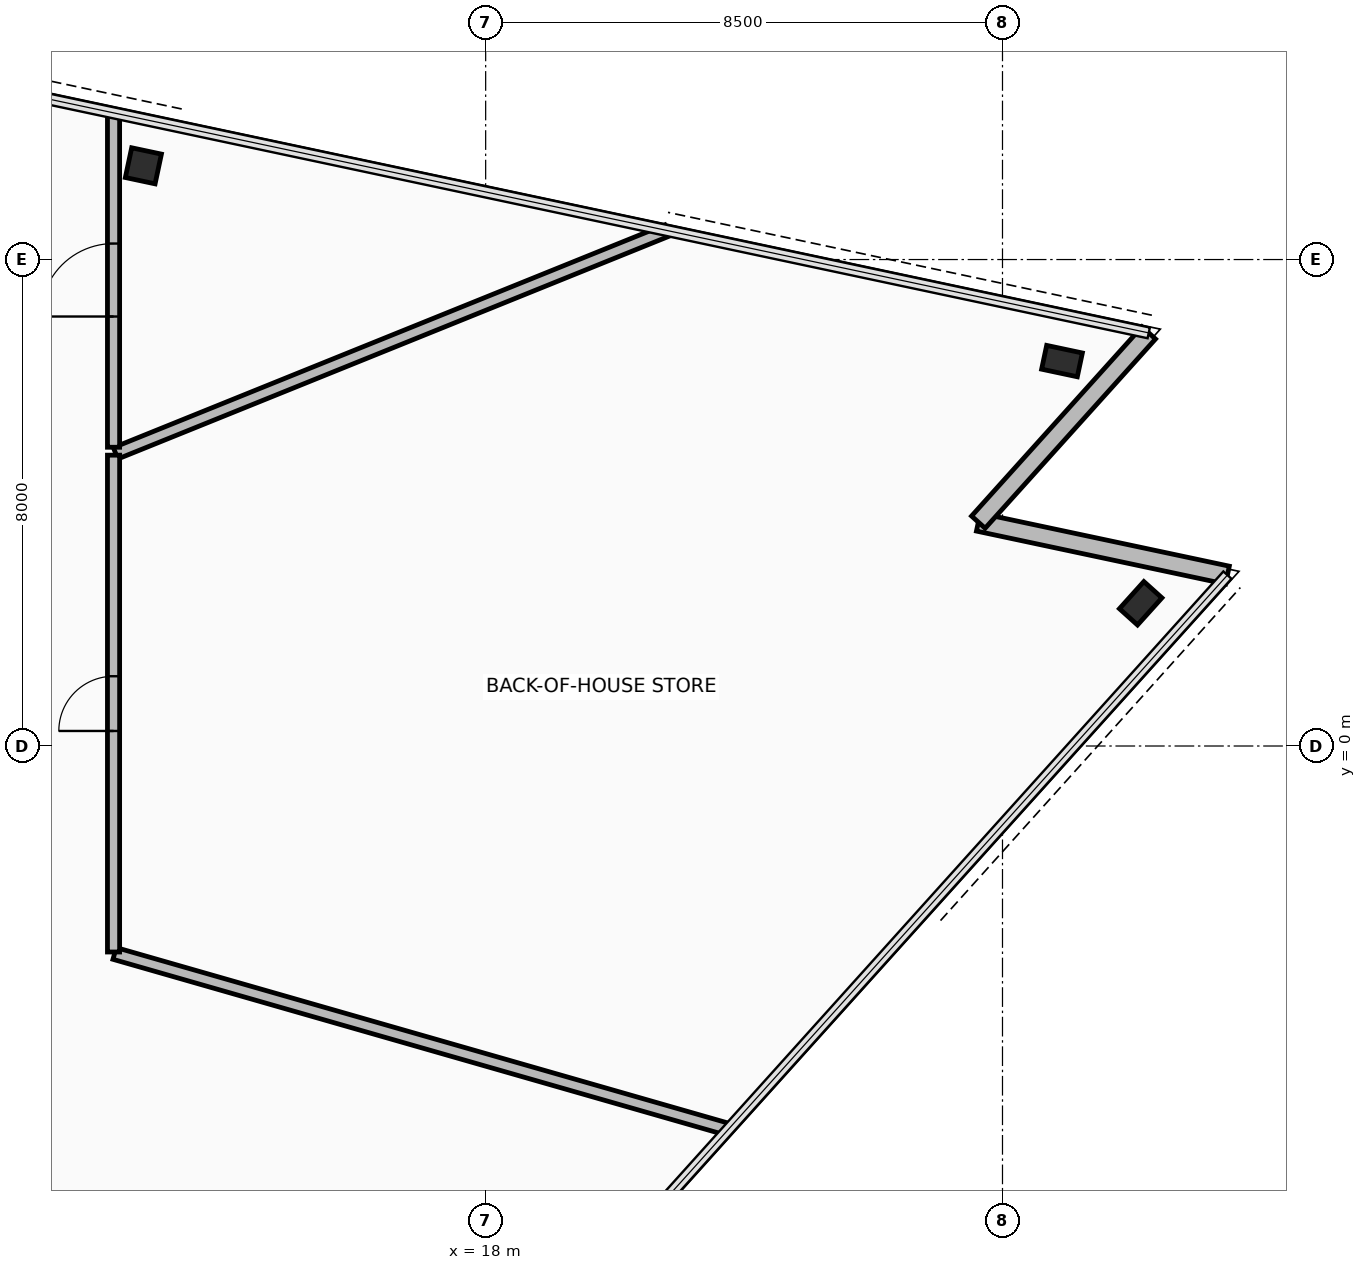
"""IFC4 building model, lengths in metres.
Left out: names, types, materials, properties, quantities, classifications, styles, units other than length and angle.
Written with IfcOpenShell. Run it as: python <this file> out.ifc"""

import sys

from ifc_helpers import new_model, si_unit, direction, frame, frame_2d, origin, origin_2d, place, context, subcontext, project, spatial, rectangle, hollow_rectangle, extrude, element, fill, save


model = new_model("IFC4")
c1 = context("Model", 3, precision=1e-05, world=origin(), true_north=direction((0.0, 1.0)))
c2 = subcontext(c1, "Body", "Model", "MODEL_VIEW")
j1 = project(units=[si_unit("LENGTHUNIT", "METRE"), si_unit("PLANEANGLEUNIT", "RADIAN")], contexts=[c1])
p1 = place(None, origin())
s1 = spatial("IfcSite", under=j1, at=p1, CompositionType="ELEMENT")
p2 = place(p1, origin())
s2 = spatial("IfcBuilding", under=s1, at=p2, CompositionType="ELEMENT")
p3 = place(p2, frame((0.0, 0.0, 196.85)))
s3 = spatial("IfcBuildingStorey", under=s2, at=p3, CompositionType="ELEMENT", Elevation=196.85)
for number, where, z_axis, x_axis in (
    (1, (28.773, 2.347, 0.0), (0.0, 0.0, 1.0), (0.669, 0.743, 0.0)),
    (2, (27.479, 6.33, 0.0), (0.0, 0.0, 1.0), (-0.978, 0.208, 0.0)),
):
    element("IfcColumn", number, at=place(p3, frame(where, z_axis=z_axis, x_axis=x_axis)), inside=s3, PredefinedType="COLUMN", context=c2, shape_type="SweptSolid", body=[
        extrude(hollow_rectangle(XDim=0.4, YDim=0.6, WallThickness=0.03, at=origin_2d()), origin(), (0.0, 0.0, 1.0), 3.6),
    ])
p4 = place(p3, frame((12.371, 9.542, -0.19), z_axis=(0.0, 0.0, 1.0), x_axis=(-0.978147600734, 0.207911690818, 0.0)))
e3 = element("IfcColumn", 3, at=p4, inside=s3, PredefinedType="COLUMN", context=c2, shape_type="SweptSolid", body=[
    extrude(hollow_rectangle(XDim=0.5, YDim=0.5, WallThickness=0.032, at=origin_2d()), origin(), (0.0, 0.0, 1.0), 3.79),
])
for number, where, z_axis, x_axis in (
    (4, (30.199, 2.811, 0.0), (0.0, 0.0, 1.0), (-0.978, 0.208, 0.0)),
    (5, (26.103, 3.681, 0.0), (0.0, 0.0, 1.0), (0.669, 0.743, 0.0)),
):
    element("IfcWall", number, at=place(p3, frame(where, z_axis=z_axis, x_axis=x_axis)), inside=s3, PredefinedType="STANDARD", context=c2, shape_type="SweptSolid", body=[
        extrude(rectangle(XDim=4.188, YDim=0.3, at=frame_2d((2.094, 0.0))), origin(), (0.0, 0.0, 1.0), 2.715),
    ])
p5 = place(p3, frame((20.983, 8.478, 0.0), z_axis=(0.0, 0.0, 1.0), x_axis=(-0.927188658935, -0.374594701969, 0.0)))
e6 = element("IfcWall", 6, at=p5, inside=s3, PredefinedType="PARTITIONING", context=c2, shape_type="SweptSolid", body=[
    extrude(rectangle(XDim=9.781, YDim=0.2, at=frame_2d((4.89, 0.0))), origin(), (0.0, 0.0, 1.0), 2.715),
])
p6 = place(p3, frame((11.88, 4.913, 0.0), z_axis=(0.0, 0.0, 1.0), x_axis=(0.0, 1.0, 0.0)))
e7 = element("IfcWall", 7, at=p6, inside=s3, PredefinedType="PARTITIONING", context=c2, shape_type="SweptSolid", body=[
    extrude(rectangle(XDim=5.499, YDim=0.2, at=frame_2d((2.75, 0.0))), origin(), (0.0, 0.0, 1.0), 2.715),
])
p7 = place(p6, frame((2.15, 0.0, 0.0)))
e8 = element("IfcOpeningElement", 8, at=p7, cuts=e7, PredefinedType="OPENING", context=c2, shape_type="SweptSolid", body=[
    extrude(rectangle(XDim=1.2, YDim=2.15, at=frame_2d((0.6, 1.075))), frame((0.0, 0.11, 0.0), z_axis=(0.0, -1.0, 0.0), x_axis=(1.0, 0.0, 0.0)), (0.0, 0.0, 1.0), 0.22),
])
p8 = place(p3, frame((21.976, -6.302, 0.0), z_axis=(0.0, 0.0, 1.0), x_axis=(-0.961257228778, 0.275652934179, 0.0)))
e9 = element("IfcWall", 9, at=p8, inside=s3, PredefinedType="PARTITIONING", context=c2, shape_type="SweptSolid", body=[
    extrude(rectangle(XDim=10.484, YDim=0.2, at=frame_2d((5.242, 0.0))), origin(), (0.0, 0.0, 1.0), 2.715),
])
p9 = place(p3, frame((11.88, -3.388, 0.0), z_axis=(0.0, 0.0, 1.0), x_axis=(0.0, 1.0, 0.0)))
e10 = element("IfcWall", 10, at=p9, inside=s3, PredefinedType="PARTITIONING", context=c2, shape_type="SweptSolid", body=[
    extrude(rectangle(XDim=8.171, YDim=0.2, at=frame_2d((4.085, 0.0))), origin(), (0.0, 0.0, 1.0), 3.42),
])
p10 = place(p9, frame((3.635, 0.0, 0.0)))
e11 = element("IfcOpeningElement", 11, at=p10, cuts=e10, PredefinedType="OPENING", context=c2, shape_type="SweptSolid", body=[
    extrude(rectangle(XDim=0.9, YDim=2.1, at=frame_2d((0.45, 1.05))), frame((0.0, 0.11, 0.0), z_axis=(0.0, -1.0, 0.0), x_axis=(1.0, 0.0, 0.0)), (0.0, 0.0, 1.0), 0.22),
])
p11 = place(p7, origin())
e12 = element("IfcDoor", 12, at=p11, inside=s3, OperationType="SINGLE_SWING_LEFT", PredefinedType="DOOR", context=c2, shape_type="SweptSolid", body=[
    extrude(rectangle(XDim=1.2, YDim=2.15, at=frame_2d((0.6, 1.075))), frame((0.0, 0.025, 0.0), z_axis=(0.0, -1.0, 0.0), x_axis=(1.0, 0.0, 0.0)), (0.0, 0.0, 1.0), 0.05),
])
fill(e8, e12)
p12 = place(p10, origin())
e13 = element("IfcDoor", 13, at=p12, inside=s3, OperationType="SINGLE_SWING_LEFT", PredefinedType="DOOR", context=c2, shape_type="SweptSolid", body=[
    extrude(rectangle(XDim=0.9, YDim=2.1, at=frame_2d((0.45, 1.05))), frame((0.0, 0.025, 0.0), z_axis=(0.0, -1.0, 0.0), x_axis=(1.0, 0.0, 0.0)), (0.0, 0.0, 1.0), 0.05),
])
fill(e11, e13)
save(model, sys.argv[1])
